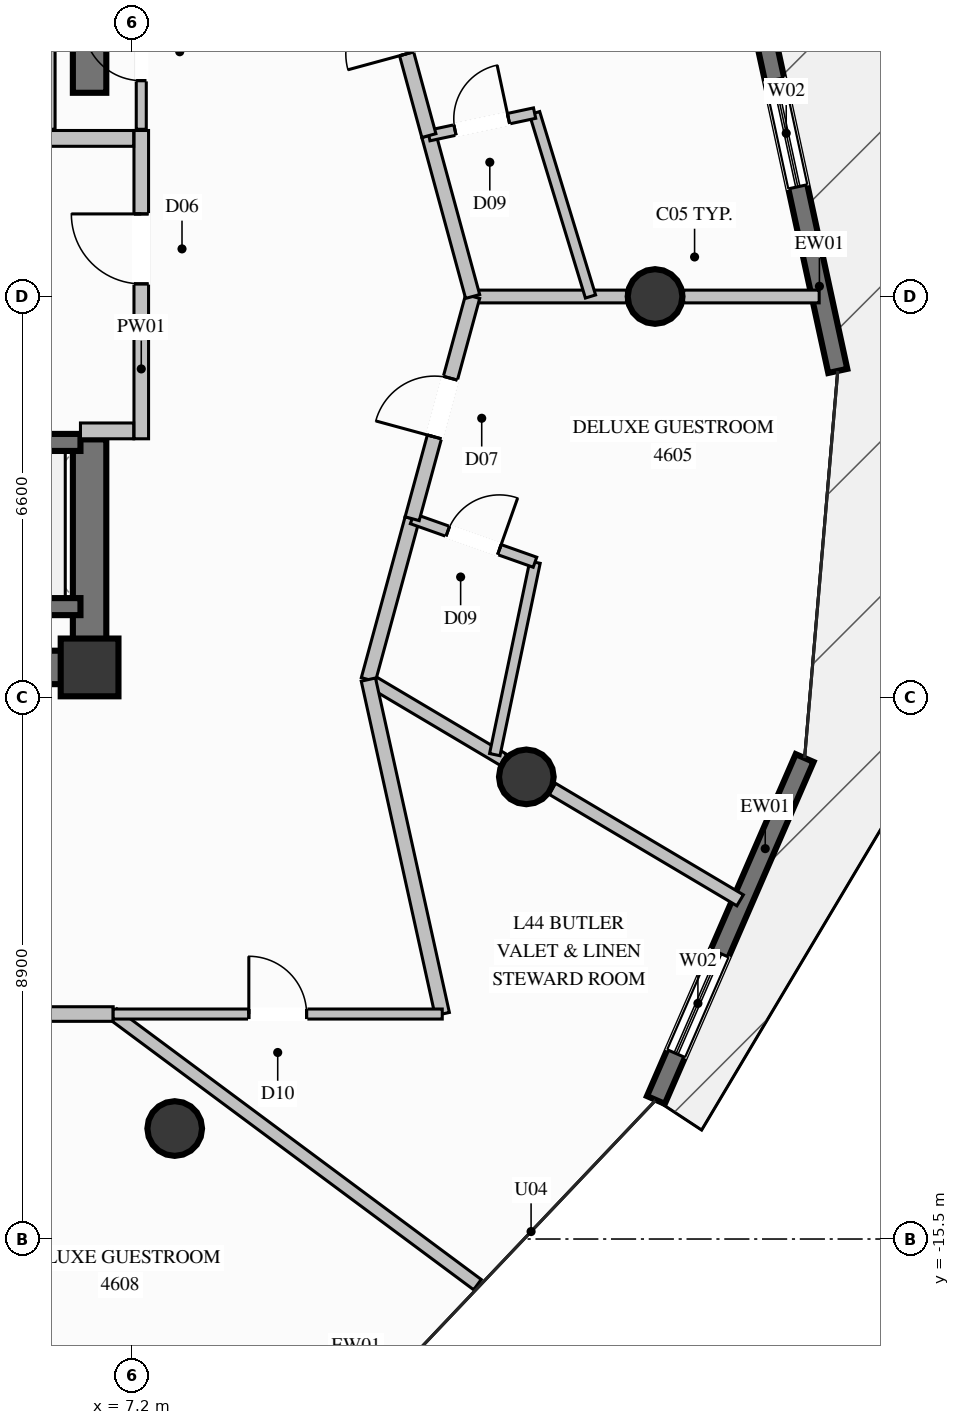
"""IFC4 building model, lengths in metres.
Left out: names, types, materials, properties, quantities, classifications, styles, units other than length and angle.
Written with IfcOpenShell. Run it as: python <this file> out.ifc"""

import sys

from ifc_helpers import new_model, si_unit, direction, frame, frame_2d, origin, origin_2d, place, context, subcontext, project, spatial, rectangle, circle, extrude, element, fill, save


model = new_model("IFC4")
c1 = context("Model", 3, precision=1e-05, world=origin(), true_north=direction((0.0, 1.0)))
c2 = subcontext(c1, "Body", "Model", "MODEL_VIEW")
j1 = project(units=[si_unit("LENGTHUNIT", "METRE"), si_unit("PLANEANGLEUNIT", "RADIAN")], contexts=[c1])
p1 = place(None, origin())
s1 = spatial("IfcSite", under=j1, at=p1, CompositionType="ELEMENT")
p2 = place(p1, origin())
s2 = spatial("IfcBuilding", under=s1, at=p2, CompositionType="ELEMENT")
p3 = place(p2, frame((0.0, 0.0, 173.2)))
s3 = spatial("IfcBuildingStorey", under=s2, at=p3, CompositionType="ELEMENT", Elevation=173.2)
p4 = place(p3, frame((6.5, -6.1, 0.0), z_axis=(0.0, 0.0, 1.0), x_axis=(1.0, 0.0, 0.0)))
e1 = element("IfcColumn", 1, at=p4, inside=s3, PredefinedType="COLUMN", context=c2, shape_type="SweptSolid", body=[
    extrude(rectangle(XDim=0.95, YDim=0.95, at=origin_2d()), origin(), (0.0, 0.0, 1.0), 3.6),
])
p5 = place(p3, frame((4.15, -6.1, 0.0), z_axis=(0.0, 0.0, 1.0), x_axis=(1.0, 0.0, 0.0)))
e2 = element("IfcWall", 2, at=p5, inside=s3, PredefinedType="SHEAR", context=c2, shape_type="SweptSolid", body=[
    extrude(rectangle(XDim=2.075, YDim=0.55, at=frame_2d((1.038, 0.0))), origin(), (0.0, 0.0, 1.0), 3.6),
])
p6 = place(p3, frame((6.5, -6.375, 0.0), z_axis=(0.0, 0.0, 1.0), x_axis=(0.0, 1.0, 0.0)))
e3 = element("IfcWall", 3, at=p6, inside=s3, PredefinedType="SHEAR", context=c2, shape_type="SweptSolid", body=[
    extrude(rectangle(XDim=4.025, YDim=0.55, at=frame_2d((2.012, 0.0))), origin(), (0.0, 0.0, 1.0), 3.6),
])
p7 = place(p3, frame((6.5, 3.35, 0.0), z_axis=(0.0, 0.0, 1.0), x_axis=(0.0, 1.0, 0.0)))
e4 = element("IfcWall", 4, at=p7, inside=s3, PredefinedType="SHEAR", context=c2, shape_type="SweptSolid", body=[
    extrude(rectangle(XDim=3.025, YDim=0.55, at=frame_2d((1.512, 0.0))), origin(), (0.0, 0.0, 1.0), 3.6),
])
for number, where, z_axis, x_axis in (
    (5, (15.8, 0.0, 0.0), (0.0, 0.0, 1.0), (1.0, 0.0, 0.0)),
    (6, (7.9, -13.683, 0.0), (0.0, 0.0, 1.0), (1.0, 0.0, 0.0)),
    (7, (13.683, -7.9, 0.0), (0.0, 0.0, 1.0), (1.0, 0.0, 0.0)),
):
    element("IfcColumn", number, at=place(p3, frame(where, z_axis=z_axis, x_axis=x_axis)), inside=s3, PredefinedType="COLUMN", context=c2, shape_type="SweptSolid", body=[
        extrude(circle(Radius=0.45, at=origin_2d()), origin(), (0.0, 0.0, 1.0), 3.6),
    ])
p8 = place(p3, frame((18.26, -7.59, 0.0), z_axis=(0.0, 0.0, 1.0), x_axis=(-0.398911001453, -0.916989647117, 0.0)))
e8 = element("IfcWall", 8, at=p8, inside=s3, PredefinedType="SOLIDWALL", context=c2, shape_type="SweptSolid", body=[
    extrude(rectangle(XDim=6.132, YDim=0.32, at=frame_2d((3.066, 0.0))), origin(), (0.0, 0.0, 1.0), 3.36),
])
p9 = place(p8, frame((3.5, 0.0, 0.35)))
e9 = element("IfcOpeningElement", 9, at=p9, cuts=e8, PredefinedType="OPENING", context=c2, shape_type="SweptSolid", body=[
    extrude(rectangle(XDim=1.8, YDim=2.6, at=frame_2d((0.9, 1.3))), frame((0.0, 0.17, 0.0), z_axis=(0.0, -1.0, 0.0), x_axis=(1.0, 0.0, 0.0)), (0.0, 0.0, 1.0), 0.34),
])
p10 = place(p3, frame((17.398, 5.262, 0.0), z_axis=(0.0, 0.0, 1.0), x_axis=(0.211992849193, -0.977271217161, 0.0)))
e10 = element("IfcWall", 10, at=p10, inside=s3, PredefinedType="SOLIDWALL", context=c2, shape_type="SweptSolid", body=[
    extrude(rectangle(XDim=6.637, YDim=0.32, at=frame_2d((3.318, 0.0))), origin(), (0.0, 0.0, 1.0), 3.36),
])
p11 = place(p10, frame((1.738, 0.0, 0.35)))
e11 = element("IfcOpeningElement", 11, at=p11, cuts=e10, PredefinedType="OPENING", context=c2, shape_type="SweptSolid", body=[
    extrude(rectangle(XDim=1.8, YDim=2.6, at=frame_2d((0.9, 1.3))), frame((0.0, 0.17, 0.0), z_axis=(0.0, -1.0, 0.0), x_axis=(1.0, 0.0, 0.0)), (0.0, 0.0, 1.0), 0.34),
])
p12 = place(p3, frame((4.15, -5.1, 0.0), z_axis=(0.0, 0.0, 1.0), x_axis=(1.0, 0.0, 0.0)))
e12 = element("IfcWall", 12, at=p12, inside=s3, PredefinedType="SOLIDWALL", context=c2, shape_type="SweptSolid", body=[
    extrude(rectangle(XDim=2.2, YDim=0.28, at=frame_2d((1.1, 0.0))), origin(), (0.0, 0.0, 1.0), 3.36),
])
p13 = place(p3, frame((6.35, -2.4, 0.0), z_axis=(0.0, 0.0, 1.0), x_axis=(-1.0, 0.0, 0.0)))
e13 = element("IfcWall", 13, at=p13, inside=s3, PredefinedType="SOLIDWALL", context=c2, shape_type="SweptSolid", body=[
    extrude(rectangle(XDim=2.2, YDim=0.28, at=frame_2d((1.1, 0.0))), origin(), (0.0, 0.0, 1.0), 3.36),
])
p14 = place(p13, frame((0.5, 0.0, 0.0)))
e14 = element("IfcOpeningElement", 14, at=p14, cuts=e13, PredefinedType="OPENING", context=c2, shape_type="SweptSolid", body=[
    extrude(rectangle(XDim=1.2, YDim=2.2, at=frame_2d((0.6, 1.1))), frame((0.0, 0.15, 0.0), z_axis=(0.0, -1.0, 0.0), x_axis=(1.0, 0.0, 0.0)), (0.0, 0.0, 1.0), 0.3),
])
p15 = place(p3, frame((7.35, -2.34, 0.0), z_axis=(0.0, 0.0, 1.0), x_axis=(0.0, 1.0, 0.0)))
e15 = element("IfcWall", 15, at=p15, inside=s3, PredefinedType="PARTITIONING", context=c2, shape_type="SweptSolid", body=[
    extrude(rectangle(XDim=5.07, YDim=0.24, at=frame_2d((2.535, 0.0))), origin(), (0.0, 0.0, 1.0), 2.445),
])
p16 = place(p15, frame((2.548, 0.0, 0.0)))
e16 = element("IfcOpeningElement", 16, at=p16, cuts=e15, PredefinedType="OPENING", context=c2, shape_type="SweptSolid", body=[
    extrude(rectangle(XDim=1.15, YDim=2.2, at=frame_2d((0.575, 1.1))), frame((0.0, 0.13, 0.0), z_axis=(0.0, -1.0, 0.0), x_axis=(1.0, 0.0, 0.0)), (0.0, 0.0, 1.0), 0.26),
])
p17 = place(p3, frame((6.35, -2.21, 0.0), z_axis=(0.0, 0.0, 1.0), x_axis=(1.0, 0.0, 0.0)))
e17 = element("IfcWall", 17, at=p17, inside=s3, PredefinedType="PARTITIONING", context=c2, shape_type="SweptSolid", body=[
    extrude(rectangle(XDim=0.875, YDim=0.26, at=frame_2d((0.438, 0.0))), origin(), (0.0, 0.0, 1.0), 3.36),
])
p18 = place(p3, frame((4.13, 2.6, 0.0), z_axis=(0.0, 0.0, 1.0), x_axis=(1.0, 0.0, 0.0)))
e18 = element("IfcWall", 18, at=p18, inside=s3, PredefinedType="PARTITIONING", context=c2, shape_type="SweptSolid", body=[
    extrude(rectangle(XDim=3.095, YDim=0.26, at=frame_2d((1.548, 0.0))), origin(), (0.0, 0.0, 1.0), 3.36),
])
p19 = place(p3, frame((7.35, 2.75, 0.0), z_axis=(0.0, 0.0, 1.0), x_axis=(0.0, 1.0, 0.0)))
e19 = element("IfcWall", 19, at=p19, inside=s3, PredefinedType="PARTITIONING", context=c2, shape_type="SweptSolid", body=[
    extrude(rectangle(XDim=2.55, YDim=0.165, at=frame_2d((1.275, 0.0))), origin(), (0.0, 0.0, 1.0), 3.36),
])
p20 = place(p19, frame((0.8, 0.0, 0.0)))
e20 = element("IfcOpeningElement", 20, at=p20, cuts=e19, PredefinedType="OPENING", context=c2, shape_type="SweptSolid", body=[
    extrude(rectangle(XDim=0.95, YDim=2.1, at=frame_2d((0.475, 1.05))), frame((0.0, 0.093, 0.0), z_axis=(0.0, -1.0, 0.0), x_axis=(1.0, 0.0, 0.0)), (0.0, 0.0, 1.0), 0.185),
])
p21 = place(p3, frame((5.85, 5.3, 0.0), z_axis=(0.0, 0.0, 1.0), x_axis=(0.0, -1.0, 0.0)))
e21 = element("IfcWall", 21, at=p21, inside=s3, PredefinedType="PARTITIONING", context=c2, shape_type="SweptSolid", body=[
    extrude(rectangle(XDim=2.55, YDim=0.165, at=frame_2d((1.275, 0.0))), origin(), (0.0, 0.0, 1.0), 2.445),
])
p22 = place(p3, frame((12.8, 0.0, 0.0), z_axis=(0.0, 0.0, 1.0), x_axis=(1.0, 0.0, 0.0)))
e22 = element("IfcWall", 22, at=p22, inside=s3, PredefinedType="PARTITIONING", context=c2, shape_type="SweptSolid", body=[
    extrude(rectangle(XDim=2.53, YDim=0.21, at=frame_2d((1.265, 0.0))), origin(), (0.0, 0.0, 1.0), 3.36),
])
p23 = place(p3, frame((16.27, 0.0, 0.0), z_axis=(0.0, 0.0, 1.0), x_axis=(1.0, 0.0, 0.0)))
e23 = element("IfcWall", 23, at=p23, inside=s3, PredefinedType="PARTITIONING", context=c2, shape_type="SweptSolid", body=[
    extrude(rectangle(XDim=2.229, YDim=0.21, at=frame_2d((1.115, 0.0))), origin(), (0.0, 0.0, 1.0), 3.36),
])
p24 = place(p3, frame((11.085, -6.3, 0.0), z_axis=(0.0, 0.0, 1.0), x_axis=(0.859827513331, -0.510584613281, 0.0)))
e24 = element("IfcWall", 24, at=p24, inside=s3, PredefinedType="PARTITIONING", context=c2, shape_type="SweptSolid", body=[
    extrude(rectangle(XDim=2.583, YDim=0.21, at=frame_2d((1.292, 0.0))), origin(), (0.0, 0.0, 1.0), 2.801),
])
p25 = place(p3, frame((14.11, -8.096, 0.0), z_axis=(0.0, 0.0, 1.0), x_axis=(0.859858473155, -0.510532473153, 0.0)))
e25 = element("IfcWall", 25, at=p25, inside=s3, PredefinedType="PARTITIONING", context=c2, shape_type="SweptSolid", body=[
    extrude(rectangle(XDim=3.592, YDim=0.21, at=frame_2d((1.796, 0.0))), origin(), (0.0, 0.0, 1.0), 3.36),
])
p26 = place(p3, frame((11.085, -6.3, 0.0), z_axis=(0.0, 0.0, 1.0), x_axis=(0.262552356383, 0.964917747872, 0.0)))
e26 = element("IfcWall", 26, at=p26, inside=s3, PredefinedType="PARTITIONING", context=c2, shape_type="SweptSolid", body=[
    extrude(rectangle(XDim=2.742, YDim=0.24, at=frame_2d((1.371, 0.0))), origin(), (0.0, 0.0, 1.0), 3.36),
])
p27 = place(p3, frame((13.164, -7.534, 0.0), z_axis=(0.0, 0.0, 1.0), x_axis=(0.204476064812, 0.978871564057, 0.0)))
e27 = element("IfcWall", 27, at=p27, inside=s3, PredefinedType="PLUMBINGWALL", context=c2, shape_type="SweptSolid", body=[
    extrude(rectangle(XDim=3.232, YDim=0.175, at=frame_2d((1.616, 0.0))), origin(), (0.0, 0.0, 1.0), 2.929),
])
p28 = place(p3, frame((11.805, -3.654, 0.0), z_axis=(0.0, 0.0, 1.0), x_axis=(0.942533085892, -0.334112828248, 0.0)))
e28 = element("IfcWall", 28, at=p28, inside=s3, PredefinedType="PLUMBINGWALL", context=c2, shape_type="SweptSolid", body=[
    extrude(rectangle(XDim=2.143, YDim=0.175, at=frame_2d((1.072, 0.0))), origin(), (0.0, 0.0, 1.0), 3.36),
])
p29 = place(p28, frame((0.622, 0.0, 0.0)))
e29 = element("IfcOpeningElement", 29, at=p29, cuts=e28, PredefinedType="OPENING", context=c2, shape_type="SweptSolid", body=[
    extrude(rectangle(XDim=0.9, YDim=2.1, at=frame_2d((0.45, 1.05))), frame((0.0, 0.098, 0.0), z_axis=(0.0, -1.0, 0.0), x_axis=(1.0, 0.0, 0.0)), (0.0, 0.0, 1.0), 0.195),
])
p30 = place(p3, frame((11.805, -3.654, 0.0), z_axis=(0.0, 0.0, 1.0), x_axis=(0.262762825819, 0.964860454868, 0.0)))
e30 = element("IfcWall", 30, at=p30, inside=s3, PredefinedType="PARTITIONING", context=c2, shape_type="SweptSolid", body=[
    extrude(rectangle(XDim=3.787, YDim=0.24, at=frame_2d((1.894, 0.0))), origin(), (0.0, 0.0, 1.0), 3.36),
])
p31 = place(p30, frame((1.394, 0.0, 0.0)))
e31 = element("IfcOpeningElement", 31, at=p31, cuts=e30, PredefinedType="OPENING", context=c2, shape_type="SweptSolid", body=[
    extrude(rectangle(XDim=1.0, YDim=2.2, at=frame_2d((0.5, 1.1))), frame((0.0, 0.13, 0.0), z_axis=(0.0, -1.0, 0.0), x_axis=(1.0, 0.0, 0.0)), (0.0, 0.0, 1.0), 0.26),
])
p32 = place(p3, frame((12.8, 0.0, 0.0), z_axis=(0.0, 0.0, 1.0), x_axis=(-0.262552356383, 0.964917747872, 0.0)))
e32 = element("IfcWall", 32, at=p32, inside=s3, PredefinedType="PARTITIONING", context=c2, shape_type="SweptSolid", body=[
    extrude(rectangle(XDim=2.742, YDim=0.24, at=frame_2d((1.371, 0.0))), origin(), (0.0, 0.0, 1.0), 3.36),
])
p33 = place(p3, frame((14.738, 0.0, 0.0), z_axis=(0.0, 0.0, 1.0), x_axis=(-0.291451232832, 0.956585688206, 0.0)))
e33 = element("IfcWall", 33, at=p33, inside=s3, PredefinedType="PLUMBINGWALL", context=c2, shape_type="SweptSolid", body=[
    extrude(rectangle(XDim=3.153, YDim=0.175, at=frame_2d((1.577, 0.0))), origin(), (0.0, 0.0, 1.0), 3.36),
])
p34 = place(p3, frame((12.08, 2.646, 0.0), z_axis=(0.0, 0.0, 1.0), x_axis=(0.978092843795, 0.208169135363, 0.0)))
e34 = element("IfcWall", 34, at=p34, inside=s3, PredefinedType="PLUMBINGWALL", context=c2, shape_type="SweptSolid", body=[
    extrude(rectangle(XDim=1.778, YDim=0.175, at=frame_2d((0.889, 0.0))), origin(), (0.0, 0.0, 1.0), 3.36),
])
p35 = place(p34, frame((0.439, 0.0, 0.0)))
e35 = element("IfcOpeningElement", 35, at=p35, cuts=e34, PredefinedType="OPENING", context=c2, shape_type="SweptSolid", body=[
    extrude(rectangle(XDim=0.9, YDim=2.1, at=frame_2d((0.45, 1.05))), frame((0.0, 0.098, 0.0), z_axis=(0.0, -1.0, 0.0), x_axis=(1.0, 0.0, 0.0)), (0.0, 0.0, 1.0), 0.195),
])
p36 = place(p3, frame((12.08, 2.646, 0.0), z_axis=(0.0, 0.0, 1.0), x_axis=(-0.262762825819, 0.964860454868, 0.0)))
e36 = element("IfcWall", 36, at=p36, inside=s3, PredefinedType="PARTITIONING", context=c2, shape_type="SweptSolid", body=[
    extrude(rectangle(XDim=3.787, YDim=0.24, at=frame_2d((1.894, 0.0))), origin(), (0.0, 0.0, 1.0), 3.36),
])
p37 = place(p36, frame((1.394, 0.0, 0.0)))
e37 = element("IfcOpeningElement", 37, at=p37, cuts=e36, PredefinedType="OPENING", context=c2, shape_type="SweptSolid", body=[
    extrude(rectangle(XDim=1.0, YDim=2.2, at=frame_2d((0.5, 1.1))), frame((0.0, 0.13, 0.0), z_axis=(0.0, -1.0, 0.0), x_axis=(1.0, 0.0, 0.0)), (0.0, 0.0, 1.0), 0.26),
])
p38 = place(p3, frame((6.888, -11.8, 0.0), z_axis=(0.0, 0.0, 1.0), x_axis=(0.802774719759, -0.596282440892, 0.0)))
e38 = element("IfcWall", 38, at=p38, inside=s3, PredefinedType="PARTITIONING", context=c2, shape_type="SweptSolid", body=[
    extrude(rectangle(XDim=7.463, YDim=0.21, at=frame_2d((3.731, 0.0))), origin(), (0.0, 0.0, 1.0), 3.36),
])
p39 = place(p3, frame((3.031, -11.8, 0.0), z_axis=(0.0, 0.0, 1.0), x_axis=(1.0, 0.0, 0.0)))
e39 = element("IfcWall", 39, at=p39, inside=s3, PredefinedType="PARTITIONING", context=c2, shape_type="SweptSolid", body=[
    extrude(rectangle(XDim=3.857, YDim=0.24, at=frame_2d((1.928, 0.0))), origin(), (0.0, 0.0, 1.0), 3.36),
])
p40 = place(p39, frame((1.428, 0.0, 0.0)))
e40 = element("IfcOpeningElement", 40, at=p40, cuts=e39, PredefinedType="OPENING", context=c2, shape_type="SweptSolid", body=[
    extrude(rectangle(XDim=1.0, YDim=2.2, at=frame_2d((0.5, 1.1))), frame((0.0, 0.13, 0.0), z_axis=(0.0, -1.0, 0.0), x_axis=(1.0, 0.0, 0.0)), (0.0, 0.0, 1.0), 0.26),
])
p41 = place(p3, frame((12.3, -11.8, 0.0), z_axis=(0.0, 0.0, 1.0), x_axis=(-0.21572328796, 0.976454537104, 0.0)))
e41 = element("IfcWall", 41, at=p41, inside=s3, PredefinedType="PARTITIONING", context=c2, shape_type="SweptSolid", body=[
    extrude(rectangle(XDim=5.633, YDim=0.24, at=frame_2d((2.816, 0.0))), origin(), (0.0, 0.0, 1.0), 3.36),
])
p42 = place(p3, frame((6.888, -11.8, 0.0), z_axis=(0.0, 0.0, 1.0), x_axis=(1.0, 0.0, 0.0)))
e42 = element("IfcWall", 42, at=p42, inside=s3, PredefinedType="PARTITIONING", context=c2, shape_type="SweptSolid", body=[
    extrude(rectangle(XDim=5.412, YDim=0.165, at=frame_2d((2.706, 0.0))), origin(), (0.0, 0.0, 1.0), 3.36),
])
p43 = place(p42, frame((2.231, 0.0, 0.0)))
e43 = element("IfcOpeningElement", 43, at=p43, cuts=e42, PredefinedType="OPENING", context=c2, shape_type="SweptSolid", body=[
    extrude(rectangle(XDim=0.95, YDim=2.1, at=frame_2d((0.475, 1.05))), frame((0.0, 0.093, 0.0), z_axis=(0.0, -1.0, 0.0), x_axis=(1.0, 0.0, 0.0)), (0.0, 0.0, 1.0), 0.185),
])
p44 = place(p9, origin())
e44 = element("IfcWindow", 44, at=p44, inside=s3, PartitioningType="SINGLE_PANEL", PredefinedType="WINDOW", context=c2, shape_type="SweptSolid", body=[
    extrude(rectangle(XDim=1.8, YDim=2.6, at=frame_2d((0.9, 1.3))), frame((0.0, 0.03, 0.0), z_axis=(0.0, -1.0, 0.0), x_axis=(1.0, 0.0, 0.0)), (0.0, 0.0, 1.0), 0.06),
])
fill(e9, e44)
p45 = place(p11, origin())
e45 = element("IfcWindow", 45, at=p45, inside=s3, PartitioningType="SINGLE_PANEL", PredefinedType="WINDOW", context=c2, shape_type="SweptSolid", body=[
    extrude(rectangle(XDim=1.8, YDim=2.6, at=frame_2d((0.9, 1.3))), frame((0.0, 0.03, 0.0), z_axis=(0.0, -1.0, 0.0), x_axis=(1.0, 0.0, 0.0)), (0.0, 0.0, 1.0), 0.06),
])
fill(e11, e45)
p46 = place(p16, origin())
e46 = element("IfcDoor", 46, at=p46, inside=s3, OperationType="SINGLE_SWING_RIGHT", PredefinedType="DOOR", context=c2, shape_type="SweptSolid", body=[
    extrude(rectangle(XDim=1.15, YDim=2.2, at=frame_2d((0.575, 1.1))), frame((0.0, 0.025, 0.0), z_axis=(0.0, -1.0, 0.0), x_axis=(1.0, 0.0, 0.0)), (0.0, 0.0, 1.0), 0.05),
])
fill(e16, e46)
p47 = place(p20, origin())
e47 = element("IfcDoor", 47, at=p47, inside=s3, OperationType="SINGLE_SWING_RIGHT", PredefinedType="DOOR", context=c2, shape_type="SweptSolid", body=[
    extrude(rectangle(XDim=0.95, YDim=2.1, at=frame_2d((0.475, 1.05))), frame((0.0, 0.025, 0.0), z_axis=(0.0, -1.0, 0.0), x_axis=(1.0, 0.0, 0.0)), (0.0, 0.0, 1.0), 0.05),
])
fill(e20, e47)
p48 = place(p29, origin())
e48 = element("IfcDoor", 48, at=p48, inside=s3, OperationType="SINGLE_SWING_RIGHT", PredefinedType="DOOR", context=c2, shape_type="SweptSolid", body=[
    extrude(rectangle(XDim=0.9, YDim=2.1, at=frame_2d((0.45, 1.05))), frame((0.0, 0.025, 0.0), z_axis=(0.0, -1.0, 0.0), x_axis=(1.0, 0.0, 0.0)), (0.0, 0.0, 1.0), 0.05),
])
fill(e29, e48)
p49 = place(p31, origin())
e49 = element("IfcDoor", 49, at=p49, inside=s3, OperationType="SINGLE_SWING_LEFT", PredefinedType="DOOR", context=c2, shape_type="SweptSolid", body=[
    extrude(rectangle(XDim=1.0, YDim=2.2, at=frame_2d((0.5, 1.1))), frame((0.0, 0.025, 0.0), z_axis=(0.0, -1.0, 0.0), x_axis=(1.0, 0.0, 0.0)), (0.0, 0.0, 1.0), 0.05),
])
fill(e31, e49)
p50 = place(p35, origin())
e50 = element("IfcDoor", 50, at=p50, inside=s3, OperationType="SINGLE_SWING_RIGHT", PredefinedType="DOOR", context=c2, shape_type="SweptSolid", body=[
    extrude(rectangle(XDim=0.9, YDim=2.1, at=frame_2d((0.45, 1.05))), frame((0.0, 0.025, 0.0), z_axis=(0.0, -1.0, 0.0), x_axis=(1.0, 0.0, 0.0)), (0.0, 0.0, 1.0), 0.05),
])
fill(e35, e50)
p51 = place(p37, origin())
e51 = element("IfcDoor", 51, at=p51, inside=s3, OperationType="SINGLE_SWING_LEFT", PredefinedType="DOOR", context=c2, shape_type="SweptSolid", body=[
    extrude(rectangle(XDim=1.0, YDim=2.2, at=frame_2d((0.5, 1.1))), frame((0.0, 0.025, 0.0), z_axis=(0.0, -1.0, 0.0), x_axis=(1.0, 0.0, 0.0)), (0.0, 0.0, 1.0), 0.05),
])
fill(e37, e51)
p52 = place(p43, origin())
e52 = element("IfcDoor", 52, at=p52, inside=s3, OperationType="SINGLE_SWING_LEFT", PredefinedType="DOOR", context=c2, shape_type="SweptSolid", body=[
    extrude(rectangle(XDim=0.95, YDim=2.1, at=frame_2d((0.475, 1.05))), frame((0.0, 0.025, 0.0), z_axis=(0.0, -1.0, 0.0), x_axis=(1.0, 0.0, 0.0)), (0.0, 0.0, 1.0), 0.05),
])
fill(e43, e52)
save(model, sys.argv[1])
